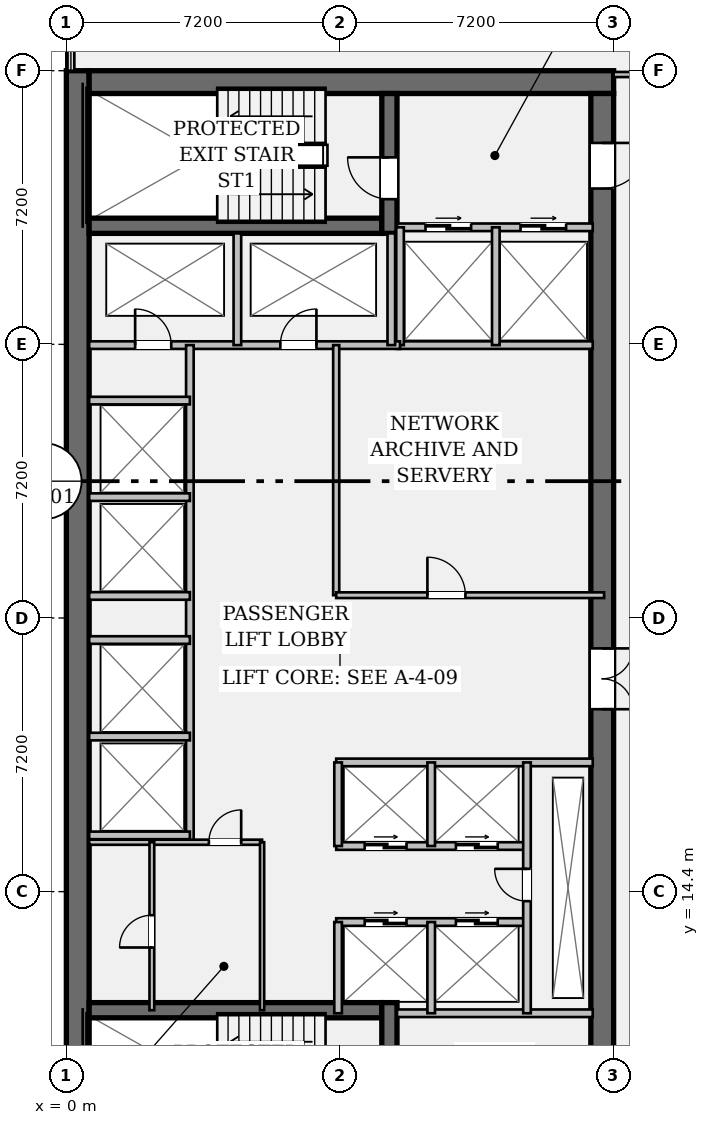
"""IFC4 building model, lengths in metres.
Left out: names, types, materials, properties, quantities, classifications, styles, units other than length and angle.
Written with IfcOpenShell. Run it as: python <this file> out.ifc"""

import sys

from ifc_helpers import new_model, si_unit, direction, frame, frame_2d, origin, place, context, subcontext, project, spatial, rectangle, extrude, element, fill, save


model = new_model("IFC4")
c1 = context("Model", 3, precision=1e-05, world=origin(), true_north=direction((0.0, 1.0)))
c2 = subcontext(c1, "Body", "Model", "MODEL_VIEW")
j1 = project(units=[si_unit("LENGTHUNIT", "METRE"), si_unit("PLANEANGLEUNIT", "RADIAN")], contexts=[c1])
p1 = place(None, origin())
s1 = spatial("IfcSite", under=j1, at=p1, CompositionType="ELEMENT")
p2 = place(p1, origin())
s2 = spatial("IfcBuilding", under=s1, at=p2, CompositionType="ELEMENT")
p3 = place(p2, frame((0.0, 0.0, 140.7)))
s3 = spatial("IfcBuildingStorey", under=s2, at=p3, CompositionType="ELEMENT", Elevation=140.7)
p4 = place(p3, frame((0.3, 7.2, 0.0), z_axis=(0.0, 0.0, 1.0), x_axis=(0.0, 1.0, 0.0)))
e1 = element("IfcWall", 1, at=p4, inside=s3, PredefinedType="SHEAR", context=c2, shape_type="SweptSolid", body=[
    extrude(rectangle(XDim=28.8, YDim=0.6, at=frame_2d((14.4, 0.0))), origin(), (0.0, 0.0, 1.0), 3.58),
])
p5 = place(p3, frame((0.6, 35.7, 0.0), z_axis=(0.0, 0.0, 1.0), x_axis=(1.0, 0.0, 0.0)))
e2 = element("IfcWall", 2, at=p5, inside=s3, PredefinedType="SHEAR", context=c2, shape_type="SweptSolid", body=[
    extrude(rectangle(XDim=13.8, YDim=0.6, at=frame_2d((6.9, 0.0))), origin(), (0.0, 0.0, 1.0), 3.58),
])
p6 = place(p3, frame((14.1, 35.4, 0.0), z_axis=(0.0, 0.0, 1.0), x_axis=(0.0, -1.0, 0.0)))
e3 = element("IfcWall", 3, at=p6, inside=s3, PredefinedType="SHEAR", context=c2, shape_type="SweptSolid", body=[
    extrude(rectangle(XDim=27.6, YDim=0.6, at=frame_2d((13.8, 0.0))), origin(), (0.0, 0.0, 1.0), 3.58),
])
p7 = place(p6, frame((1.3, 0.0, 0.0)))
e4 = element("IfcOpeningElement", 4, at=p7, cuts=e3, PredefinedType="OPENING", context=c2, shape_type="SweptSolid", body=[
    extrude(rectangle(XDim=1.2, YDim=2.15, at=frame_2d((0.6, 1.075))), frame((0.0, 0.312, 0.0), z_axis=(0.0, -1.0, 0.0), x_axis=(1.0, 0.0, 0.0)), (0.0, 0.0, 1.0), 0.624),
])
p8 = place(p6, frame((25.25, 0.0, 0.0)))
e5 = element("IfcOpeningElement", 5, at=p8, cuts=e3, PredefinedType="OPENING", context=c2, shape_type="SweptSolid", body=[
    extrude(rectangle(XDim=1.2, YDim=2.15, at=frame_2d((0.6, 1.075))), frame((0.0, 0.312, 0.0), z_axis=(0.0, -1.0, 0.0), x_axis=(1.0, 0.0, 0.0)), (0.0, 0.0, 1.0), 0.624),
])
p9 = place(p6, frame((14.6, 0.0, 0.0)))
e6 = element("IfcOpeningElement", 6, at=p9, cuts=e3, PredefinedType="OPENING", context=c2, shape_type="SweptSolid", body=[
    extrude(rectangle(XDim=1.6, YDim=2.2, at=frame_2d((0.8, 1.1))), frame((0.0, 0.312, 0.0), z_axis=(0.0, -1.0, 0.0), x_axis=(1.0, 0.0, 0.0)), (0.0, 0.0, 1.0), 0.624),
])
for number, where, z_axis, x_axis in (
    (7, (0.6, 31.92, 0.0), (0.0, 0.0, 1.0), (1.0, 0.0, 0.0)),
    (8, (0.6, 11.28, 0.0), (0.0, 0.0, 1.0), (1.0, 0.0, 0.0)),
):
    element("IfcWall", number, at=place(p3, frame(where, z_axis=z_axis, x_axis=x_axis)), inside=s3, PredefinedType="SHEAR", context=c2, shape_type="SweptSolid", body=[
        extrude(rectangle(XDim=7.7, YDim=0.4, at=frame_2d((3.85, 0.0))), origin(), (0.0, 0.0, 1.0), 3.58),
    ])
p10 = place(p3, frame((8.5, 31.72, 0.0), z_axis=(0.0, 0.0, 1.0), x_axis=(0.0, 1.0, 0.0)))
e9 = element("IfcWall", 9, at=p10, inside=s3, PredefinedType="SHEAR", context=c2, shape_type="SweptSolid", body=[
    extrude(rectangle(XDim=3.68, YDim=0.4, at=frame_2d((1.84, 0.0))), origin(), (0.0, 0.0, 1.0), 3.58),
])
p11 = place(p10, frame((0.9, 0.0, 0.0)))
e10 = element("IfcOpeningElement", 10, at=p11, cuts=e9, PredefinedType="OPENING", context=c2, shape_type="SweptSolid", body=[
    extrude(rectangle(XDim=1.1, YDim=2.15, at=frame_2d((0.55, 1.075))), frame((0.0, 0.212, 0.0), z_axis=(0.0, -1.0, 0.0), x_axis=(1.0, 0.0, 0.0)), (0.0, 0.0, 1.0), 0.424),
])
p12 = place(p3, frame((8.5, 7.8, 0.0), z_axis=(0.0, 0.0, 1.0), x_axis=(0.0, 1.0, 0.0)))
e11 = element("IfcWall", 11, at=p12, inside=s3, PredefinedType="SHEAR", context=c2, shape_type="SweptSolid", body=[
    extrude(rectangle(XDim=3.68, YDim=0.4, at=frame_2d((1.84, 0.0))), origin(), (0.0, 0.0, 1.0), 3.58),
])
p13 = place(p12, frame((0.85, 0.0, 0.0)))
e12 = element("IfcOpeningElement", 12, at=p13, cuts=e11, PredefinedType="OPENING", context=c2, shape_type="SweptSolid", body=[
    extrude(rectangle(XDim=1.1, YDim=2.15, at=frame_2d((0.55, 1.075))), frame((0.0, 0.212, 0.0), z_axis=(0.0, -1.0, 0.0), x_axis=(1.0, 0.0, 0.0)), (0.0, 0.0, 1.0), 0.424),
])
p14 = place(p3, frame((8.7, 31.88, 0.0), z_axis=(0.0, 0.0, 1.0), x_axis=(1.0, 0.0, 0.0)))
e13 = element("IfcWall", 13, at=p14, inside=s3, PredefinedType="PARTITIONING", context=c2, shape_type="SweptSolid", body=[
    extrude(rectangle(XDim=5.15, YDim=0.2, at=frame_2d((2.575, 0.0))), origin(), (0.0, 0.0, 1.0), 3.58),
])
p15 = place(p14, frame((0.75, 0.0, 0.0)))
e14 = element("IfcOpeningElement", 14, at=p15, cuts=e13, PredefinedType="OPENING", context=c2, shape_type="SweptSolid", body=[
    extrude(rectangle(XDim=1.2, YDim=2.2, at=frame_2d((0.6, 1.1))), frame((0.0, 0.112, 0.0), z_axis=(0.0, -1.0, 0.0), x_axis=(1.0, 0.0, 0.0)), (0.0, 0.0, 1.0), 0.224),
])
p16 = place(p14, frame((3.25, 0.0, 0.0)))
e15 = element("IfcOpeningElement", 15, at=p16, cuts=e13, PredefinedType="OPENING", context=c2, shape_type="SweptSolid", body=[
    extrude(rectangle(XDim=1.2, YDim=2.2, at=frame_2d((0.6, 1.1))), frame((0.0, 0.112, 0.0), z_axis=(0.0, -1.0, 0.0), x_axis=(1.0, 0.0, 0.0)), (0.0, 0.0, 1.0), 0.224),
])
for number, where, z_axis, x_axis in (
    (16, (8.7, 11.2, 0.0), (0.0, 0.0, 1.0), (1.0, 0.0, 0.0)),
    (17, (8.7, 28.78, 0.0), (0.0, 0.0, 1.0), (1.0, 0.0, 0.0)),
):
    element("IfcWall", number, at=place(p3, frame(where, z_axis=z_axis, x_axis=x_axis)), inside=s3, PredefinedType="PARTITIONING", context=c2, shape_type="SweptSolid", body=[
        extrude(rectangle(XDim=5.15, YDim=0.2, at=frame_2d((2.575, 0.0))), origin(), (0.0, 0.0, 1.0), 3.58),
    ])
for number, where, z_axis, x_axis in (
    (18, (8.78, 28.78, 0.0), (0.0, 0.0, 1.0), (0.0, 1.0, 0.0)),
    (19, (11.3, 28.78, 0.0), (0.0, 0.0, 1.0), (0.0, 1.0, 0.0)),
):
    element("IfcWall", number, at=place(p3, frame(where, z_axis=z_axis, x_axis=x_axis)), inside=s3, PredefinedType="PARTITIONING", context=c2, shape_type="SweptSolid", body=[
        extrude(rectangle(XDim=3.1, YDim=0.2, at=frame_2d((1.55, 0.0))), origin(), (0.0, 0.0, 1.0), 3.58),
    ])
p17 = place(p3, frame((0.6, 28.78, 0.0), z_axis=(0.0, 0.0, 1.0), x_axis=(1.0, 0.0, 0.0)))
e20 = element("IfcWall", 20, at=p17, inside=s3, PredefinedType="PARTITIONING", context=c2, shape_type="SweptSolid", body=[
    extrude(rectangle(XDim=8.18, YDim=0.2, at=frame_2d((4.09, 0.0))), origin(), (0.0, 0.0, 1.0), 3.58),
])
p18 = place(p17, frame((1.21, 0.0, 0.0)))
e21 = element("IfcOpeningElement", 21, at=p18, cuts=e20, PredefinedType="OPENING", context=c2, shape_type="SweptSolid", body=[
    extrude(rectangle(XDim=0.95, YDim=2.15, at=frame_2d((0.475, 1.075))), frame((0.0, 0.112, 0.0), z_axis=(0.0, -1.0, 0.0), x_axis=(1.0, 0.0, 0.0)), (0.0, 0.0, 1.0), 0.224),
])
p19 = place(p17, frame((5.03, 0.0, 0.0)))
e22 = element("IfcOpeningElement", 22, at=p19, cuts=e20, PredefinedType="OPENING", context=c2, shape_type="SweptSolid", body=[
    extrude(rectangle(XDim=0.95, YDim=2.15, at=frame_2d((0.475, 1.075))), frame((0.0, 0.112, 0.0), z_axis=(0.0, -1.0, 0.0), x_axis=(1.0, 0.0, 0.0)), (0.0, 0.0, 1.0), 0.224),
])
for number, where, z_axis, x_axis in (
    (23, (4.5, 28.78, 0.0), (0.0, 0.0, 1.0), (0.0, 1.0, 0.0)),
    (24, (8.55, 28.78, 0.0), (0.0, 0.0, 1.0), (0.0, 1.0, 0.0)),
):
    element("IfcWall", number, at=place(p3, frame(where, z_axis=z_axis, x_axis=x_axis)), inside=s3, PredefinedType="PARTITIONING", context=c2, shape_type="SweptSolid", body=[
        extrude(rectangle(XDim=2.94, YDim=0.2, at=frame_2d((1.47, 0.0))), origin(), (0.0, 0.0, 1.0), 3.58),
    ])
p20 = place(p3, frame((3.25, 15.7, 0.0), z_axis=(0.0, 0.0, 1.0), x_axis=(0.0, 1.0, 0.0)))
e25 = element("IfcWall", 25, at=p20, inside=s3, PredefinedType="PARTITIONING", context=c2, shape_type="SweptSolid", body=[
    extrude(rectangle(XDim=13.08, YDim=0.2, at=frame_2d((6.54, 0.0))), origin(), (0.0, 0.0, 1.0), 3.58),
])
for number, where, z_axis, x_axis in (
    (26, (0.6, 15.88, 0.0), (0.0, 0.0, 1.0), (1.0, 0.0, 0.0)),
    (27, (0.6, 18.48, 0.0), (0.0, 0.0, 1.0), (1.0, 0.0, 0.0)),
    (28, (0.6, 22.18, 0.0), (0.0, 0.0, 1.0), (1.0, 0.0, 0.0)),
    (29, (0.6, 24.78, 0.0), (0.0, 0.0, 1.0), (1.0, 0.0, 0.0)),
    (30, (0.6, 21.02, 0.0), (0.0, 0.0, 1.0), (1.0, 0.0, 0.0)),
    (31, (0.6, 27.32, 0.0), (0.0, 0.0, 1.0), (1.0, 0.0, 0.0)),
):
    element("IfcWall", number, at=place(p3, frame(where, z_axis=z_axis, x_axis=x_axis)), inside=s3, PredefinedType="PARTITIONING", context=c2, shape_type="SweptSolid", body=[
        extrude(rectangle(XDim=2.65, YDim=0.2, at=frame_2d((1.325, 0.0))), origin(), (0.0, 0.0, 1.0), 3.58),
    ])
p21 = place(p3, frame((7.1, 22.2, 0.0), z_axis=(0.0, 0.0, 1.0), x_axis=(0.0, 1.0, 0.0)))
e32 = element("IfcWall", 32, at=p21, inside=s3, PredefinedType="PARTITIONING", context=c2, shape_type="SweptSolid", body=[
    extrude(rectangle(XDim=6.58, YDim=0.16, at=frame_2d((3.29, 0.0))), origin(), (0.0, 0.0, 1.0), 3.58),
])
p22 = place(p3, frame((7.1, 22.2, 0.0), z_axis=(0.0, 0.0, 1.0), x_axis=(1.0, 0.0, 0.0)))
e33 = element("IfcWall", 33, at=p22, inside=s3, PredefinedType="PARTITIONING", context=c2, shape_type="SweptSolid", body=[
    extrude(rectangle(XDim=7.05, YDim=0.15, at=frame_2d((3.525, 0.0))), origin(), (0.0, 0.0, 1.0), 3.58),
])
p23 = place(p22, frame((2.4, 0.0, 0.0)))
e34 = element("IfcOpeningElement", 34, at=p23, cuts=e33, PredefinedType="OPENING", context=c2, shape_type="SweptSolid", body=[
    extrude(rectangle(XDim=1.0, YDim=2.15, at=frame_2d((0.5, 1.075))), frame((0.0, 0.087, 0.0), z_axis=(0.0, -1.0, 0.0), x_axis=(1.0, 0.0, 0.0)), (0.0, 0.0, 1.0), 0.174),
])
p24 = place(p3, frame((7.1, 17.8, 0.0), z_axis=(0.0, 0.0, 1.0), x_axis=(1.0, 0.0, 0.0)))
e35 = element("IfcWall", 35, at=p24, inside=s3, PredefinedType="PARTITIONING", context=c2, shape_type="SweptSolid", body=[
    extrude(rectangle(XDim=6.75, YDim=0.2, at=frame_2d((3.375, 0.0))), origin(), (0.0, 0.0, 1.0), 3.58),
])
p25 = place(p3, frame((7.1, 15.6, 0.0), z_axis=(0.0, 0.0, 1.0), x_axis=(1.0, 0.0, 0.0)))
e36 = element("IfcWall", 36, at=p25, inside=s3, PredefinedType="PARTITIONING", context=c2, shape_type="SweptSolid", body=[
    extrude(rectangle(XDim=5.02, YDim=0.2, at=frame_2d((2.51, 0.0))), origin(), (0.0, 0.0, 1.0), 3.58),
])
p26 = place(p25, frame((0.75, 0.0, 0.0)))
e37 = element("IfcOpeningElement", 37, at=p26, cuts=e36, PredefinedType="OPENING", context=c2, shape_type="SweptSolid", body=[
    extrude(rectangle(XDim=1.1, YDim=2.2, at=frame_2d((0.55, 1.1))), frame((0.0, 0.112, 0.0), z_axis=(0.0, -1.0, 0.0), x_axis=(1.0, 0.0, 0.0)), (0.0, 0.0, 1.0), 0.224),
])
p27 = place(p25, frame((3.15, 0.0, 0.0)))
e38 = element("IfcOpeningElement", 38, at=p27, cuts=e36, PredefinedType="OPENING", context=c2, shape_type="SweptSolid", body=[
    extrude(rectangle(XDim=1.1, YDim=2.2, at=frame_2d((0.55, 1.1))), frame((0.0, 0.112, 0.0), z_axis=(0.0, -1.0, 0.0), x_axis=(1.0, 0.0, 0.0)), (0.0, 0.0, 1.0), 0.224),
])
p28 = place(p3, frame((7.1, 13.6, 0.0), z_axis=(0.0, 0.0, 1.0), x_axis=(1.0, 0.0, 0.0)))
e39 = element("IfcWall", 39, at=p28, inside=s3, PredefinedType="PARTITIONING", context=c2, shape_type="SweptSolid", body=[
    extrude(rectangle(XDim=5.02, YDim=0.2, at=frame_2d((2.51, 0.0))), origin(), (0.0, 0.0, 1.0), 3.58),
])
p29 = place(p28, frame((0.75, 0.0, 0.0)))
e40 = element("IfcOpeningElement", 40, at=p29, cuts=e39, PredefinedType="OPENING", context=c2, shape_type="SweptSolid", body=[
    extrude(rectangle(XDim=1.1, YDim=2.2, at=frame_2d((0.55, 1.1))), frame((0.0, 0.112, 0.0), z_axis=(0.0, -1.0, 0.0), x_axis=(1.0, 0.0, 0.0)), (0.0, 0.0, 1.0), 0.224),
])
p30 = place(p28, frame((3.15, 0.0, 0.0)))
e41 = element("IfcOpeningElement", 41, at=p30, cuts=e39, PredefinedType="OPENING", context=c2, shape_type="SweptSolid", body=[
    extrude(rectangle(XDim=1.1, YDim=2.2, at=frame_2d((0.55, 1.1))), frame((0.0, 0.112, 0.0), z_axis=(0.0, -1.0, 0.0), x_axis=(1.0, 0.0, 0.0)), (0.0, 0.0, 1.0), 0.224),
])
p31 = place(p3, frame((7.15, 15.6, 0.0), z_axis=(0.0, 0.0, 1.0), x_axis=(0.0, 1.0, 0.0)))
e42 = element("IfcWall", 42, at=p31, inside=s3, PredefinedType="PARTITIONING", context=c2, shape_type="SweptSolid", body=[
    extrude(rectangle(XDim=2.2, YDim=0.2, at=frame_2d((1.1, 0.0))), origin(), (0.0, 0.0, 1.0), 3.58),
])
p32 = place(p3, frame((7.15, 11.2, 0.0), z_axis=(0.0, 0.0, 1.0), x_axis=(0.0, 1.0, 0.0)))
e43 = element("IfcWall", 43, at=p32, inside=s3, PredefinedType="PARTITIONING", context=c2, shape_type="SweptSolid", body=[
    extrude(rectangle(XDim=2.4, YDim=0.2, at=frame_2d((1.2, 0.0))), origin(), (0.0, 0.0, 1.0), 3.58),
])
p33 = place(p3, frame((9.6, 15.6, 0.0), z_axis=(0.0, 0.0, 1.0), x_axis=(0.0, 1.0, 0.0)))
e44 = element("IfcWall", 44, at=p33, inside=s3, PredefinedType="PARTITIONING", context=c2, shape_type="SweptSolid", body=[
    extrude(rectangle(XDim=2.2, YDim=0.2, at=frame_2d((1.1, 0.0))), origin(), (0.0, 0.0, 1.0), 3.58),
])
p34 = place(p3, frame((9.6, 11.2, 0.0), z_axis=(0.0, 0.0, 1.0), x_axis=(0.0, 1.0, 0.0)))
e45 = element("IfcWall", 45, at=p34, inside=s3, PredefinedType="PARTITIONING", context=c2, shape_type="SweptSolid", body=[
    extrude(rectangle(XDim=2.4, YDim=0.2, at=frame_2d((1.2, 0.0))), origin(), (0.0, 0.0, 1.0), 3.58),
])
p35 = place(p3, frame((12.12, 11.2, 0.0), z_axis=(0.0, 0.0, 1.0), x_axis=(0.0, 1.0, 0.0)))
e46 = element("IfcWall", 46, at=p35, inside=s3, PredefinedType="PARTITIONING", context=c2, shape_type="SweptSolid", body=[
    extrude(rectangle(XDim=6.6, YDim=0.2, at=frame_2d((3.3, 0.0))), origin(), (0.0, 0.0, 1.0), 3.58),
])
p36 = place(p35, frame((2.95, 0.0, 0.0)))
e47 = element("IfcOpeningElement", 47, at=p36, cuts=e46, PredefinedType="OPENING", context=c2, shape_type="SweptSolid", body=[
    extrude(rectangle(XDim=0.85, YDim=2.15, at=frame_2d((0.425, 1.075))), frame((0.0, 0.112, 0.0), z_axis=(0.0, -1.0, 0.0), x_axis=(1.0, 0.0, 0.0)), (0.0, 0.0, 1.0), 0.224),
])
p37 = place(p3, frame((0.6, 15.7, 0.0), z_axis=(0.0, 0.0, 1.0), x_axis=(1.0, 0.0, 0.0)))
e48 = element("IfcWall", 48, at=p37, inside=s3, PredefinedType="PARTITIONING", context=c2, shape_type="SweptSolid", body=[
    extrude(rectangle(XDim=4.55, YDim=0.135, at=frame_2d((2.275, 0.0))), origin(), (0.0, 0.0, 1.0), 3.58),
])
p38 = place(p37, frame((3.15, 0.0, 0.0)))
e49 = element("IfcOpeningElement", 49, at=p38, cuts=e48, PredefinedType="OPENING", context=c2, shape_type="SweptSolid", body=[
    extrude(rectangle(XDim=0.85, YDim=2.15, at=frame_2d((0.425, 1.075))), frame((0.0, 0.08, 0.0), z_axis=(0.0, -1.0, 0.0), x_axis=(1.0, 0.0, 0.0)), (0.0, 0.0, 1.0), 0.159),
])
p39 = place(p3, frame((5.15, 11.28, 0.0), z_axis=(0.0, 0.0, 1.0), x_axis=(0.0, 1.0, 0.0)))
e50 = element("IfcWall", 50, at=p39, inside=s3, PredefinedType="PARTITIONING", context=c2, shape_type="SweptSolid", body=[
    extrude(rectangle(XDim=4.42, YDim=0.11, at=frame_2d((2.21, 0.0))), origin(), (0.0, 0.0, 1.0), 3.58),
])
p40 = place(p3, frame((2.25, 11.28, 0.0), z_axis=(0.0, 0.0, 1.0), x_axis=(0.0, 1.0, 0.0)))
e51 = element("IfcWall", 51, at=p40, inside=s3, PredefinedType="PARTITIONING", context=c2, shape_type="SweptSolid", body=[
    extrude(rectangle(XDim=4.42, YDim=0.125, at=frame_2d((2.21, 0.0))), origin(), (0.0, 0.0, 1.0), 3.58),
])
p41 = place(p40, frame((1.65, 0.0, 0.0)))
e52 = element("IfcOpeningElement", 52, at=p41, cuts=e51, PredefinedType="OPENING", context=c2, shape_type="SweptSolid", body=[
    extrude(rectangle(XDim=0.85, YDim=2.15, at=frame_2d((0.425, 1.075))), frame((0.0, 0.074, 0.0), z_axis=(0.0, -1.0, 0.0), x_axis=(1.0, 0.0, 0.0)), (0.0, 0.0, 1.0), 0.149),
])
p42 = place(p3, frame((14.4, 35.9, 0.0), z_axis=(0.0, 0.0, 1.0), x_axis=(1.0, 0.0, 0.0)))
e53 = element("IfcWall", 53, at=p42, inside=s3, PredefinedType="PARTITIONING", context=c2, shape_type="SweptSolid", body=[
    extrude(rectangle(XDim=2.95, YDim=0.135, at=frame_2d((1.475, 0.0))), origin(), (0.0, 0.0, 1.0), 2.869),
])
p43 = place(p42, frame((0.95, 0.0, 0.0)))
e54 = element("IfcOpeningElement", 54, at=p43, cuts=e53, PredefinedType="OPENING", context=c2, shape_type="SweptSolid", body=[
    extrude(rectangle(XDim=1.0, YDim=2.15, at=frame_2d((0.5, 1.075))), frame((0.0, 0.08, 0.0), z_axis=(0.0, -1.0, 0.0), x_axis=(1.0, 0.0, 0.0)), (0.0, 0.0, 1.0), 0.159),
])
p44 = place(p11, origin())
e55 = element("IfcDoor", 55, at=p44, inside=s3, OperationType="SINGLE_SWING_RIGHT", PredefinedType="DOOR", context=c2, shape_type="SweptSolid", body=[
    extrude(rectangle(XDim=1.1, YDim=2.15, at=frame_2d((0.55, 1.075))), frame((0.0, 0.025, 0.0), z_axis=(0.0, -1.0, 0.0), x_axis=(1.0, 0.0, 0.0)), (0.0, 0.0, 1.0), 0.05),
])
fill(e10, e55)
p45 = place(p7, origin())
e56 = element("IfcDoor", 56, at=p45, inside=s3, OperationType="SINGLE_SWING_LEFT", PredefinedType="DOOR", context=c2, shape_type="SweptSolid", body=[
    extrude(rectangle(XDim=1.2, YDim=2.15, at=frame_2d((0.6, 1.075))), frame((0.0, 0.025, 0.0), z_axis=(0.0, -1.0, 0.0), x_axis=(1.0, 0.0, 0.0)), (0.0, 0.0, 1.0), 0.05),
])
fill(e4, e56)
p46 = place(p15, origin())
e57 = element("IfcDoor", 57, at=p46, inside=s3, OperationType="DOUBLE_DOOR_SLIDING", PredefinedType="DOOR", context=c2, shape_type="SweptSolid", body=[
    extrude(rectangle(XDim=1.2, YDim=2.2, at=frame_2d((0.6, 1.1))), frame((0.0, 0.025, 0.0), z_axis=(0.0, -1.0, 0.0), x_axis=(1.0, 0.0, 0.0)), (0.0, 0.0, 1.0), 0.05),
])
fill(e14, e57)
p47 = place(p16, origin())
e58 = element("IfcDoor", 58, at=p47, inside=s3, OperationType="DOUBLE_DOOR_SLIDING", PredefinedType="DOOR", context=c2, shape_type="SweptSolid", body=[
    extrude(rectangle(XDim=1.2, YDim=2.2, at=frame_2d((0.6, 1.1))), frame((0.0, 0.025, 0.0), z_axis=(0.0, -1.0, 0.0), x_axis=(1.0, 0.0, 0.0)), (0.0, 0.0, 1.0), 0.05),
])
fill(e15, e58)
p48 = place(p18, origin())
e59 = element("IfcDoor", 59, at=p48, inside=s3, OperationType="SINGLE_SWING_LEFT", PredefinedType="DOOR", context=c2, shape_type="SweptSolid", body=[
    extrude(rectangle(XDim=0.95, YDim=2.15, at=frame_2d((0.475, 1.075))), frame((0.0, 0.025, 0.0), z_axis=(0.0, -1.0, 0.0), x_axis=(1.0, 0.0, 0.0)), (0.0, 0.0, 1.0), 0.05),
])
fill(e21, e59)
p49 = place(p19, origin())
e60 = element("IfcDoor", 60, at=p49, inside=s3, OperationType="SINGLE_SWING_RIGHT", PredefinedType="DOOR", context=c2, shape_type="SweptSolid", body=[
    extrude(rectangle(XDim=0.95, YDim=2.15, at=frame_2d((0.475, 1.075))), frame((0.0, 0.025, 0.0), z_axis=(0.0, -1.0, 0.0), x_axis=(1.0, 0.0, 0.0)), (0.0, 0.0, 1.0), 0.05),
])
fill(e22, e60)
p50 = place(p9, origin())
e61 = element("IfcDoor", 61, at=p50, inside=s3, OperationType="DOUBLE_DOOR_SINGLE_SWING", PredefinedType="DOOR", context=c2, shape_type="SweptSolid", body=[
    extrude(rectangle(XDim=1.6, YDim=2.2, at=frame_2d((0.8, 1.1))), frame((0.0, 0.025, 0.0), z_axis=(0.0, -1.0, 0.0), x_axis=(1.0, 0.0, 0.0)), (0.0, 0.0, 1.0), 0.05),
])
fill(e6, e61)
p51 = place(p23, origin())
e62 = element("IfcDoor", 62, at=p51, inside=s3, OperationType="SINGLE_SWING_LEFT", PredefinedType="DOOR", context=c2, shape_type="SweptSolid", body=[
    extrude(rectangle(XDim=1.0, YDim=2.15, at=frame_2d((0.5, 1.075))), frame((0.0, 0.025, 0.0), z_axis=(0.0, -1.0, 0.0), x_axis=(1.0, 0.0, 0.0)), (0.0, 0.0, 1.0), 0.05),
])
fill(e34, e62)
p52 = place(p36, origin())
e63 = element("IfcDoor", 63, at=p52, inside=s3, OperationType="SINGLE_SWING_RIGHT", PredefinedType="DOOR", context=c2, shape_type="SweptSolid", body=[
    extrude(rectangle(XDim=0.85, YDim=2.15, at=frame_2d((0.425, 1.075))), frame((0.0, 0.025, 0.0), z_axis=(0.0, -1.0, 0.0), x_axis=(1.0, 0.0, 0.0)), (0.0, 0.0, 1.0), 0.05),
])
fill(e47, e63)
p53 = place(p26, origin())
e64 = element("IfcDoor", 64, at=p53, inside=s3, OperationType="DOUBLE_DOOR_SLIDING", PredefinedType="DOOR", context=c2, shape_type="SweptSolid", body=[
    extrude(rectangle(XDim=1.1, YDim=2.2, at=frame_2d((0.55, 1.1))), frame((0.0, 0.025, 0.0), z_axis=(0.0, -1.0, 0.0), x_axis=(1.0, 0.0, 0.0)), (0.0, 0.0, 1.0), 0.05),
])
fill(e37, e64)
p54 = place(p27, origin())
e65 = element("IfcDoor", 65, at=p54, inside=s3, OperationType="DOUBLE_DOOR_SLIDING", PredefinedType="DOOR", context=c2, shape_type="SweptSolid", body=[
    extrude(rectangle(XDim=1.1, YDim=2.2, at=frame_2d((0.55, 1.1))), frame((0.0, 0.025, 0.0), z_axis=(0.0, -1.0, 0.0), x_axis=(1.0, 0.0, 0.0)), (0.0, 0.0, 1.0), 0.05),
])
fill(e38, e65)
p55 = place(p29, origin())
e66 = element("IfcDoor", 66, at=p55, inside=s3, OperationType="DOUBLE_DOOR_SLIDING", PredefinedType="DOOR", context=c2, shape_type="SweptSolid", body=[
    extrude(rectangle(XDim=1.1, YDim=2.2, at=frame_2d((0.55, 1.1))), frame((0.0, 0.025, 0.0), z_axis=(0.0, -1.0, 0.0), x_axis=(1.0, 0.0, 0.0)), (0.0, 0.0, 1.0), 0.05),
])
fill(e40, e66)
p56 = place(p30, origin())
e67 = element("IfcDoor", 67, at=p56, inside=s3, OperationType="DOUBLE_DOOR_SLIDING", PredefinedType="DOOR", context=c2, shape_type="SweptSolid", body=[
    extrude(rectangle(XDim=1.1, YDim=2.2, at=frame_2d((0.55, 1.1))), frame((0.0, 0.025, 0.0), z_axis=(0.0, -1.0, 0.0), x_axis=(1.0, 0.0, 0.0)), (0.0, 0.0, 1.0), 0.05),
])
fill(e41, e67)
p57 = place(p38, origin())
e68 = element("IfcDoor", 68, at=p57, inside=s3, OperationType="SINGLE_SWING_RIGHT", PredefinedType="DOOR", context=c2, shape_type="SweptSolid", body=[
    extrude(rectangle(XDim=0.85, YDim=2.15, at=frame_2d((0.425, 1.075))), frame((0.0, 0.025, 0.0), z_axis=(0.0, -1.0, 0.0), x_axis=(1.0, 0.0, 0.0)), (0.0, 0.0, 1.0), 0.05),
])
fill(e49, e68)
p58 = place(p41, origin())
e69 = element("IfcDoor", 69, at=p58, inside=s3, OperationType="SINGLE_SWING_LEFT", PredefinedType="DOOR", context=c2, shape_type="SweptSolid", body=[
    extrude(rectangle(XDim=0.85, YDim=2.15, at=frame_2d((0.425, 1.075))), frame((0.0, 0.025, 0.0), z_axis=(0.0, -1.0, 0.0), x_axis=(1.0, 0.0, 0.0)), (0.0, 0.0, 1.0), 0.05),
])
fill(e52, e69)
save(model, sys.argv[1])
